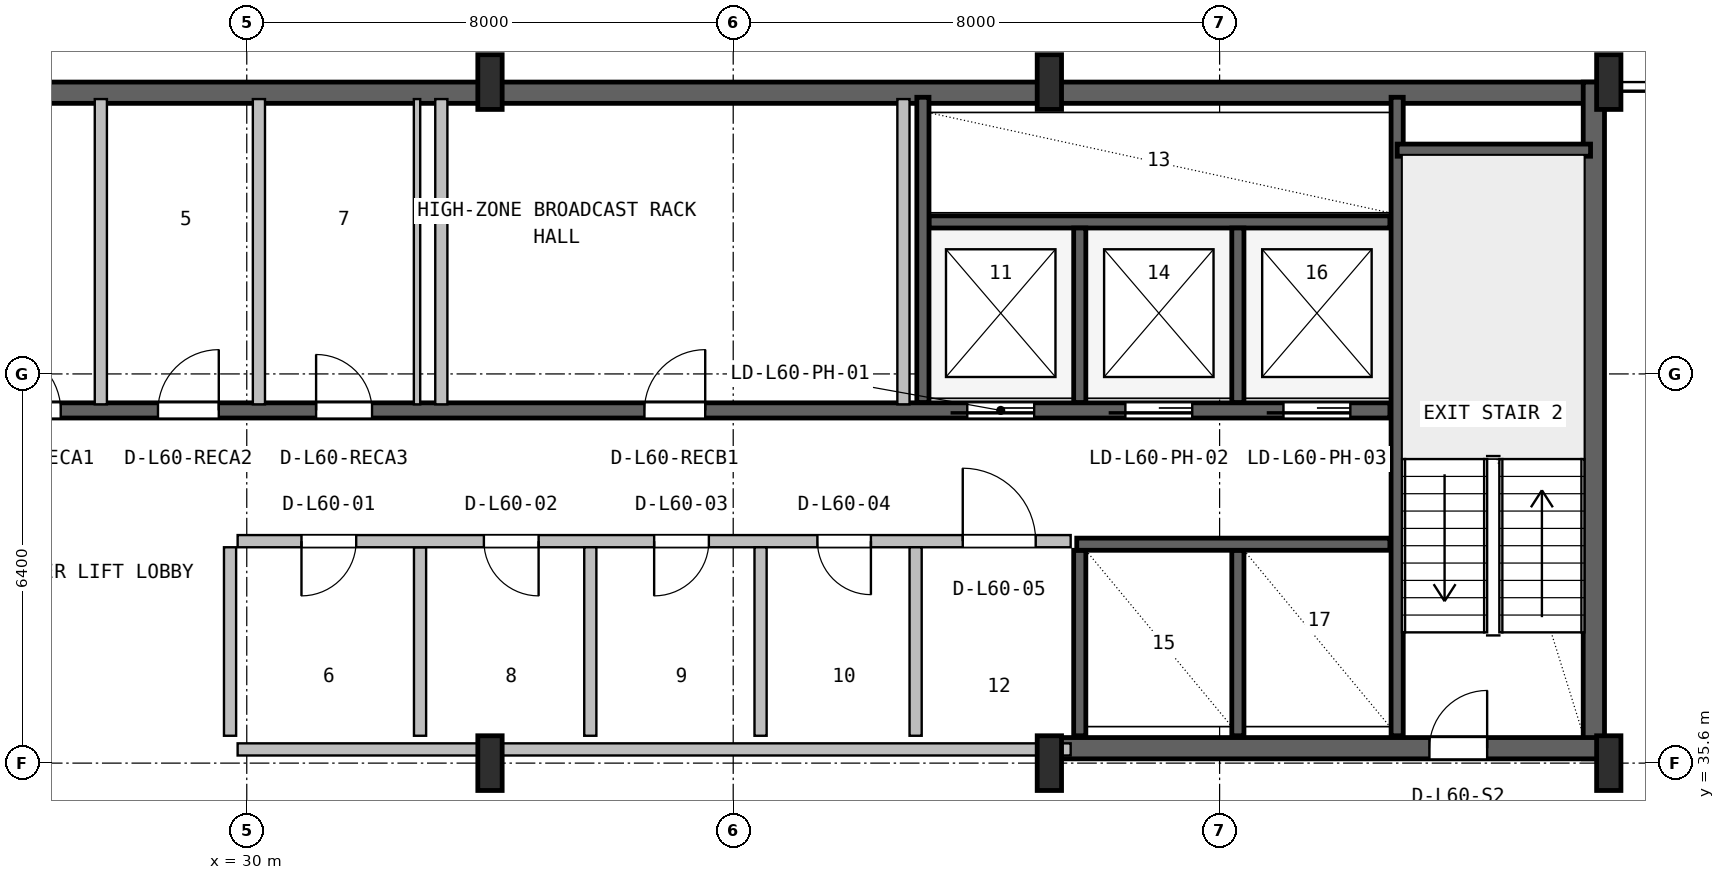
"""IFC4 building model, lengths in metres.
Left out: names, types, materials, properties, quantities, classifications, styles, units other than length and angle.
Written with IfcOpenShell. Run it as: python <this file> out.ifc"""

import sys

from ifc_helpers import new_model, si_unit, direction, frame, frame_2d, origin, origin_2d, place, context, subcontext, project, spatial, rectangle, i_section, extrude, source, transform, mapped, element, fill, save


model = new_model("IFC4")
c1 = context("Model", 3, precision=1e-05, world=origin(), true_north=direction((0.0, 1.0)))
c2 = subcontext(c1, "Body", "Model", "MODEL_VIEW")
j1 = project(units=[si_unit("LENGTHUNIT", "METRE"), si_unit("PLANEANGLEUNIT", "RADIAN")], contexts=[c1])
p1 = place(None, origin())
s1 = spatial("IfcSite", under=j1, at=p1, CompositionType="ELEMENT")
p2 = place(p1, origin())
s2 = spatial("IfcBuilding", under=s1, at=p2, CompositionType="ELEMENT")
p3 = place(p2, frame((0.0, 0.0, 243.2)))
s3 = spatial("IfcBuildingStorey", under=s2, at=p3, CompositionType="ELEMENT", Elevation=243.2)
p4 = place(p3, frame((15.6, 46.625, 0.0), z_axis=(0.0, 0.0, 1.0), x_axis=(1.0, 0.0, 0.0)))
e1 = element("IfcWall", 1, at=p4, inside=s3, PredefinedType="SHEAR", context=c2, shape_type="SweptSolid", body=[
    extrude(rectangle(XDim=36.8, YDim=0.35, at=frame_2d((18.4, 0.0))), origin(), (0.0, 0.0, 1.0), 3.55),
])
p5 = place(p3, frame((52.155, 35.67, 0.0), z_axis=(0.0, 0.0, 1.0), x_axis=(0.0, 1.0, 0.0)))
e2 = element("IfcWall", 2, at=p5, inside=s3, PredefinedType="SHEAR", context=c2, shape_type="SweptSolid", body=[
    extrude(rectangle(XDim=11.13, YDim=0.35, at=frame_2d((5.565, 0.0))), origin(), (0.0, 0.0, 1.0), 3.55),
])
p6 = place(p3, frame((43.2, 35.845, 0.0), z_axis=(0.0, 0.0, 1.0), x_axis=(1.0, 0.0, 0.0)))
e3 = element("IfcWall", 3, at=p6, inside=s3, PredefinedType="SHEAR", context=c2, shape_type="SweptSolid", body=[
    extrude(rectangle(XDim=9.13, YDim=0.35, at=frame_2d((4.565, 0.0))), origin(), (0.0, 0.0, 1.0), 3.55),
])
p7 = place(p6, frame((6.25, 0.0, 0.0)))
e4 = element("IfcOpeningElement", 4, at=p7, cuts=e3, PredefinedType="OPENING", context=c2, shape_type="SweptSolid", body=[
    extrude(rectangle(XDim=0.95, YDim=2.1, at=frame_2d((0.475, 1.05))), frame((0.0, 0.185, 0.0), z_axis=(0.0, -1.0, 0.0), x_axis=(1.0, 0.0, 0.0)), (0.0, 0.0, 1.0), 0.37),
])
m1 = source(origin(), c2, "Body", "SweptSolid", [
    extrude(i_section(OverallWidth=0.4, OverallDepth=0.9, WebThickness=0.016, FlangeThickness=0.028, FilletRadius=0.016, at=origin_2d()), origin(), (0.0, 0.0, 1.0), 3.8),
])
for number, where, z_axis, x_axis in (
    (5, (34.0, 35.6, 0.0), (0.0, 0.0, 1.0), (1.0, 0.0, 0.0)),
    (6, (34.0, 46.8, 0.0), (0.0, 0.0, 1.0), (1.0, 0.0, 0.0)),
    (7, (43.2, 35.6, 0.0), (0.0, 0.0, 1.0), (1.0, 0.0, 0.0)),
    (8, (43.2, 46.8, 0.0), (0.0, 0.0, 1.0), (1.0, 0.0, 0.0)),
    (9, (52.4, 35.6, 0.0), (0.0, 0.0, 1.0), (1.0, 0.0, 0.0)),
    (10, (52.4, 46.8, 0.0), (0.0, 0.0, 1.0), (1.0, 0.0, 0.0)),
):
    element("IfcColumn", number, at=place(p3, frame(where, z_axis=z_axis, x_axis=x_axis)), inside=s3, PredefinedType="COLUMN", context=c2, shape_type="MappedRepresentation", body=[
        mapped(m1, transform((0.0, 0.0, 0.0), x_axis=(1.0, 0.0, 0.0), y_axis=(0.0, 1.0, 0.0), z_axis=(0.0, 0.0, 1.0), scale=1.0)),
    ])
p8 = place(p3, frame((48.92, 36.05, 0.0), z_axis=(0.0, 0.0, 1.0), x_axis=(0.0, 1.0, 0.0)))
e11 = element("IfcWall", 11, at=p8, inside=s3, PredefinedType="SHEAR", context=c2, shape_type="SweptSolid", body=[
    extrude(rectangle(XDim=10.5, YDim=0.2, at=frame_2d((5.25, 0.0))), origin(), (0.0, 0.0, 1.0), 3.55),
])
p9 = place(p3, frame((48.92, 45.68, 0.0), z_axis=(0.0, 0.0, 1.0), x_axis=(1.0, 0.0, 0.0)))
e12 = element("IfcWall", 12, at=p9, inside=s3, PredefinedType="SHEAR", context=c2, shape_type="SweptSolid", body=[
    extrude(rectangle(XDim=3.18, YDim=0.2, at=frame_2d((1.59, 0.0))), origin(), (0.0, 0.0, 1.0), 3.55),
])
p10 = place(p3, frame((24.98, 41.4, 0.0), z_axis=(0.0, 0.0, 1.0), x_axis=(1.0, 0.0, 0.0)))
e13 = element("IfcWall", 13, at=p10, inside=s3, PredefinedType="SHEAR", context=c2, shape_type="SweptSolid", body=[
    extrude(rectangle(XDim=23.82, YDim=0.25, at=frame_2d((11.91, 0.0))), origin(), (0.0, 0.0, 1.0), 3.55),
])
p11 = place(p10, frame((16.87, 0.0, 0.0)))
e14 = element("IfcOpeningElement", 14, at=p11, cuts=e13, PredefinedType="OPENING", context=c2, shape_type="SweptSolid", body=[
    extrude(rectangle(XDim=1.1, YDim=2.18, at=frame_2d((0.55, 1.09))), frame((0.0, 0.135, 0.0), z_axis=(0.0, -1.0, 0.0), x_axis=(1.0, 0.0, 0.0)), (0.0, 0.0, 1.0), 0.27),
])
p12 = place(p10, frame((19.47, 0.0, 0.0)))
e15 = element("IfcOpeningElement", 15, at=p12, cuts=e13, PredefinedType="OPENING", context=c2, shape_type="SweptSolid", body=[
    extrude(rectangle(XDim=1.1, YDim=2.18, at=frame_2d((0.55, 1.09))), frame((0.0, 0.135, 0.0), z_axis=(0.0, -1.0, 0.0), x_axis=(1.0, 0.0, 0.0)), (0.0, 0.0, 1.0), 0.27),
])
p13 = place(p10, frame((22.07, 0.0, 0.0)))
e16 = element("IfcOpeningElement", 16, at=p13, cuts=e13, PredefinedType="OPENING", context=c2, shape_type="SweptSolid", body=[
    extrude(rectangle(XDim=1.1, YDim=2.18, at=frame_2d((0.55, 1.09))), frame((0.0, 0.135, 0.0), z_axis=(0.0, -1.0, 0.0), x_axis=(1.0, 0.0, 0.0)), (0.0, 0.0, 1.0), 0.27),
])
p14 = place(p10, frame((0.96, 0.0, 0.0)))
e17 = element("IfcOpeningElement", 17, at=p14, cuts=e13, PredefinedType="OPENING", context=c2, shape_type="SweptSolid", body=[
    extrude(rectangle(XDim=1.0, YDim=2.08, at=frame_2d((0.5, 1.04))), frame((0.0, 0.135, 0.0), z_axis=(0.0, -1.0, 0.0), x_axis=(1.0, 0.0, 0.0)), (0.0, 0.0, 1.0), 0.27),
])
p15 = place(p10, frame((3.56, 0.0, 0.0)))
e18 = element("IfcOpeningElement", 18, at=p15, cuts=e13, PredefinedType="OPENING", context=c2, shape_type="SweptSolid", body=[
    extrude(rectangle(XDim=1.0, YDim=2.08, at=frame_2d((0.5, 1.04))), frame((0.0, 0.135, 0.0), z_axis=(0.0, -1.0, 0.0), x_axis=(1.0, 0.0, 0.0)), (0.0, 0.0, 1.0), 0.27),
])
p16 = place(p10, frame((6.16, 0.0, 0.0)))
e19 = element("IfcOpeningElement", 19, at=p16, cuts=e13, PredefinedType="OPENING", context=c2, shape_type="SweptSolid", body=[
    extrude(rectangle(XDim=0.92, YDim=2.08, at=frame_2d((0.46, 1.04))), frame((0.0, 0.135, 0.0), z_axis=(0.0, -1.0, 0.0), x_axis=(1.0, 0.0, 0.0)), (0.0, 0.0, 1.0), 0.27),
])
p17 = place(p10, frame((11.56, 0.0, 0.0)))
e20 = element("IfcOpeningElement", 20, at=p17, cuts=e13, PredefinedType="OPENING", context=c2, shape_type="SweptSolid", body=[
    extrude(rectangle(XDim=1.0, YDim=2.08, at=frame_2d((0.5, 1.04))), frame((0.0, 0.135, 0.0), z_axis=(0.0, -1.0, 0.0), x_axis=(1.0, 0.0, 0.0)), (0.0, 0.0, 1.0), 0.27),
])
p18 = place(p3, frame((41.22, 44.5, 0.0), z_axis=(0.0, 0.0, 1.0), x_axis=(1.0, 0.0, 0.0)))
e21 = element("IfcWall", 21, at=p18, inside=s3, PredefinedType="SHEAR", context=c2, shape_type="SweptSolid", body=[
    extrude(rectangle(XDim=7.58, YDim=0.2, at=frame_2d((3.79, 0.0))), origin(), (0.0, 0.0, 1.0), 3.55),
])
p19 = place(p3, frame((41.12, 41.53, 0.0), z_axis=(0.0, 0.0, 1.0), x_axis=(0.0, 1.0, 0.0)))
e22 = element("IfcWall", 22, at=p19, inside=s3, PredefinedType="SHEAR", context=c2, shape_type="SweptSolid", body=[
    extrude(rectangle(XDim=5.02, YDim=0.2, at=frame_2d((2.51, 0.0))), origin(), (0.0, 0.0, 1.0), 3.55),
])
for number, where, z_axis, x_axis in (
    (23, (43.7, 41.53, 0.0), (0.0, 0.0, 1.0), (0.0, 1.0, 0.0)),
    (24, (46.3, 41.53, 0.0), (0.0, 0.0, 1.0), (0.0, 1.0, 0.0)),
):
    element("IfcWall", number, at=place(p3, frame(where, z_axis=z_axis, x_axis=x_axis)), inside=s3, PredefinedType="SHEAR", context=c2, shape_type="SweptSolid", body=[
        extrude(rectangle(XDim=2.87, YDim=0.2, at=frame_2d((1.435, 0.0))), origin(), (0.0, 0.0, 1.0), 3.55),
    ])
for number, where, z_axis, x_axis in (
    (25, (43.7, 36.05, 0.0), (0.0, 0.0, 1.0), (0.0, 1.0, 0.0)),
    (26, (46.3, 36.05, 0.0), (0.0, 0.0, 1.0), (0.0, 1.0, 0.0)),
):
    element("IfcWall", number, at=place(p3, frame(where, z_axis=z_axis, x_axis=x_axis)), inside=s3, PredefinedType="SHEAR", context=c2, shape_type="SweptSolid", body=[
        extrude(rectangle(XDim=3.05, YDim=0.2, at=frame_2d((1.525, 0.0))), origin(), (0.0, 0.0, 1.0), 3.55),
    ])
p20 = place(p3, frame((43.65, 39.2, 0.0), z_axis=(0.0, 0.0, 1.0), x_axis=(1.0, 0.0, 0.0)))
e27 = element("IfcWall", 27, at=p20, inside=s3, PredefinedType="SHEAR", context=c2, shape_type="SweptSolid", body=[
    extrude(rectangle(XDim=5.15, YDim=0.2, at=frame_2d((2.575, 0.0))), origin(), (0.0, 0.0, 1.0), 3.55),
])
p21 = place(p3, frame((29.85, 35.825, 0.0), z_axis=(0.0, 0.0, 1.0), x_axis=(1.0, 0.0, 0.0)))
e28 = element("IfcWall", 28, at=p21, inside=s3, PredefinedType="SOLIDWALL", context=c2, shape_type="SweptSolid", body=[
    extrude(rectangle(XDim=13.7, YDim=0.2, at=frame_2d((6.85, 0.0))), origin(), (0.0, 0.0, 1.0), 2.575),
])
p22 = place(p3, frame((32.85, 36.05, 0.0), z_axis=(0.0, 0.0, 1.0), x_axis=(0.0, 1.0, 0.0)))
e29 = element("IfcWall", 29, at=p22, inside=s3, PredefinedType="PLUMBINGWALL", context=c2, shape_type="SweptSolid", body=[
    extrude(rectangle(XDim=3.1, YDim=0.2, at=frame_2d((1.55, 0.0))), origin(), (0.0, 0.0, 1.0), 3.53),
])
p23 = place(p3, frame((29.85, 39.25, 0.0), z_axis=(0.0, 0.0, 1.0), x_axis=(1.0, 0.0, 0.0)))
e30 = element("IfcWall", 30, at=p23, inside=s3, PredefinedType="SOLIDWALL", context=c2, shape_type="SweptSolid", body=[
    extrude(rectangle(XDim=13.7, YDim=0.2, at=frame_2d((6.85, 0.0))), origin(), (0.0, 0.0, 1.0), 3.53),
])
p24 = place(p23, frame((1.05, 0.0, 0.0)))
e31 = element("IfcOpeningElement", 31, at=p24, cuts=e30, PredefinedType="OPENING", context=c2, shape_type="SweptSolid", body=[
    extrude(rectangle(XDim=0.9, YDim=2.06, at=frame_2d((0.45, 1.03))), frame((0.0, 0.11, 0.0), z_axis=(0.0, -1.0, 0.0), x_axis=(1.0, 0.0, 0.0)), (0.0, 0.0, 1.0), 0.22),
])
p25 = place(p23, frame((4.05, 0.0, 0.0)))
e32 = element("IfcOpeningElement", 32, at=p25, cuts=e30, PredefinedType="OPENING", context=c2, shape_type="SweptSolid", body=[
    extrude(rectangle(XDim=0.9, YDim=2.06, at=frame_2d((0.45, 1.03))), frame((0.0, 0.11, 0.0), z_axis=(0.0, -1.0, 0.0), x_axis=(1.0, 0.0, 0.0)), (0.0, 0.0, 1.0), 0.22),
])
p26 = place(p23, frame((6.85, 0.0, 0.0)))
e33 = element("IfcOpeningElement", 33, at=p26, cuts=e30, PredefinedType="OPENING", context=c2, shape_type="SweptSolid", body=[
    extrude(rectangle(XDim=0.9, YDim=2.06, at=frame_2d((0.45, 1.03))), frame((0.0, 0.11, 0.0), z_axis=(0.0, -1.0, 0.0), x_axis=(1.0, 0.0, 0.0)), (0.0, 0.0, 1.0), 0.22),
])
p27 = place(p23, frame((9.535, 0.0, 0.0)))
e34 = element("IfcOpeningElement", 34, at=p27, cuts=e30, PredefinedType="OPENING", context=c2, shape_type="SweptSolid", body=[
    extrude(rectangle(XDim=0.88, YDim=2.06, at=frame_2d((0.44, 1.03))), frame((0.0, 0.11, 0.0), z_axis=(0.0, -1.0, 0.0), x_axis=(1.0, 0.0, 0.0)), (0.0, 0.0, 1.0), 0.22),
])
p28 = place(p23, frame((11.925, 0.0, 0.0)))
e35 = element("IfcOpeningElement", 35, at=p28, cuts=e30, PredefinedType="OPENING", context=c2, shape_type="SweptSolid", body=[
    extrude(rectangle(XDim=1.2, YDim=2.1, at=frame_2d((0.6, 1.05))), frame((0.0, 0.11, 0.0), z_axis=(0.0, -1.0, 0.0), x_axis=(1.0, 0.0, 0.0)), (0.0, 0.0, 1.0), 0.22),
])
for number, where, z_axis, x_axis in (
    (36, (29.725, 36.05, 0.0), (0.0, 0.0, 1.0), (0.0, 1.0, 0.0)),
    (37, (35.65, 36.05, 0.0), (0.0, 0.0, 1.0), (0.0, 1.0, 0.0)),
    (38, (38.45, 36.05, 0.0), (0.0, 0.0, 1.0), (0.0, 1.0, 0.0)),
):
    element("IfcWall", number, at=place(p3, frame(where, z_axis=z_axis, x_axis=x_axis)), inside=s3, PredefinedType="PLUMBINGWALL", context=c2, shape_type="SweptSolid", body=[
        extrude(rectangle(XDim=3.1, YDim=0.2, at=frame_2d((1.55, 0.0))), origin(), (0.0, 0.0, 1.0), 3.53),
    ])
p29 = place(p3, frame((41.0, 36.05, 0.0), z_axis=(0.0, 0.0, 1.0), x_axis=(0.0, 1.0, 0.0)))
e39 = element("IfcWall", 39, at=p29, inside=s3, PredefinedType="SOLIDWALL", context=c2, shape_type="SweptSolid", body=[
    extrude(rectangle(XDim=3.1, YDim=0.2, at=frame_2d((1.55, 0.0))), origin(), (0.0, 0.0, 1.0), 3.53),
])
for number, where, z_axis, x_axis in (
    (40, (27.6, 41.5, 0.0), (0.0, 0.0, 1.0), (0.0, 1.0, 0.0)),
    (41, (30.2, 41.5, 0.0), (0.0, 0.0, 1.0), (0.0, 1.0, 0.0)),
):
    element("IfcWall", number, at=place(p3, frame(where, z_axis=z_axis, x_axis=x_axis)), inside=s3, PredefinedType="SOLIDWALL", context=c2, shape_type="SweptSolid", body=[
        extrude(rectangle(XDim=5.02, YDim=0.2, at=frame_2d((2.51, 0.0))), origin(), (0.0, 0.0, 1.0), 3.53),
    ])
p30 = place(p3, frame((32.8, 41.5, 0.0), z_axis=(0.0, 0.0, 1.0), x_axis=(0.0, 1.0, 0.0)))
e42 = element("IfcWall", 42, at=p30, inside=s3, PredefinedType="PARTITIONING", context=c2, shape_type="SweptSolid", body=[
    extrude(rectangle(XDim=5.02, YDim=0.105, at=frame_2d((2.51, 0.0))), origin(), (0.0, 0.0, 1.0), 3.53),
])
for number, where, z_axis, x_axis in (
    (43, (40.8, 41.5, 0.0), (0.0, 0.0, 1.0), (0.0, 1.0, 0.0)),
    (44, (33.2, 41.5, 0.0), (0.0, 0.0, 1.0), (0.0, 1.0, 0.0)),
):
    element("IfcWall", number, at=place(p3, frame(where, z_axis=z_axis, x_axis=x_axis)), inside=s3, PredefinedType="SOLIDWALL", context=c2, shape_type="SweptSolid", body=[
        extrude(rectangle(XDim=5.02, YDim=0.2, at=frame_2d((2.51, 0.0))), origin(), (0.0, 0.0, 1.0), 3.53),
    ])
m2 = source(origin(), c2, "Body", "SweptSolid", [
    extrude(rectangle(XDim=0.95, YDim=2.1, at=frame_2d((0.475, 1.05))), frame((0.0, 0.025, 0.0), z_axis=(0.0, -1.0, 0.0), x_axis=(1.0, 0.0, 0.0)), (0.0, 0.0, 1.0), 0.05),
])
p31 = place(p7, origin())
e45 = element("IfcDoor", 45, at=p31, inside=s3, OperationType="SINGLE_SWING_RIGHT", PredefinedType="DOOR", context=c2, shape_type="MappedRepresentation", body=[
    mapped(m2, transform((0.0, 0.0, 0.0), x_axis=(1.0, 0.0, 0.0), y_axis=(0.0, 1.0, 0.0), z_axis=(0.0, 0.0, 1.0), scale=1.0)),
])
fill(e4, e45)
m3 = source(origin(), c2, "Body", "SweptSolid", [
    extrude(rectangle(XDim=1.1, YDim=2.18, at=frame_2d((0.55, 1.09))), frame((0.0, 0.025, 0.0), z_axis=(0.0, -1.0, 0.0), x_axis=(1.0, 0.0, 0.0)), (0.0, 0.0, 1.0), 0.05),
])
p32 = place(p11, frame((1.1, 0.0, 0.0), z_axis=(0.0, 0.0, 1.0), x_axis=(-1.0, 0.0, 0.0)))
e46 = element("IfcDoor", 46, at=p32, inside=s3, OperationType="SLIDING_TO_LEFT", PredefinedType="DOOR", context=c2, shape_type="MappedRepresentation", body=[
    mapped(m3, transform((0.0, 0.0, 0.0), x_axis=(1.0, 0.0, 0.0), y_axis=(0.0, 1.0, 0.0), z_axis=(0.0, 0.0, 1.0), scale=1.0)),
])
fill(e14, e46)
p33 = place(p12, frame((1.1, 0.0, 0.0), z_axis=(0.0, 0.0, 1.0), x_axis=(-1.0, 0.0, 0.0)))
e47 = element("IfcDoor", 47, at=p33, inside=s3, OperationType="SLIDING_TO_LEFT", PredefinedType="DOOR", context=c2, shape_type="MappedRepresentation", body=[
    mapped(m3, transform((0.0, 0.0, 0.0), x_axis=(1.0, 0.0, 0.0), y_axis=(0.0, 1.0, 0.0), z_axis=(0.0, 0.0, 1.0), scale=1.0)),
])
fill(e15, e47)
p34 = place(p13, frame((1.1, 0.0, 0.0), z_axis=(0.0, 0.0, 1.0), x_axis=(-1.0, 0.0, 0.0)))
e48 = element("IfcDoor", 48, at=p34, inside=s3, OperationType="SLIDING_TO_LEFT", PredefinedType="DOOR", context=c2, shape_type="MappedRepresentation", body=[
    mapped(m3, transform((0.0, 0.0, 0.0), x_axis=(1.0, 0.0, 0.0), y_axis=(0.0, 1.0, 0.0), z_axis=(0.0, 0.0, 1.0), scale=1.0)),
])
fill(e16, e48)
m4 = source(origin(), c2, "Body", "SweptSolid", [
    extrude(rectangle(XDim=1.0, YDim=2.08, at=frame_2d((0.5, 1.04))), frame((0.0, 0.025, 0.0), z_axis=(0.0, -1.0, 0.0), x_axis=(1.0, 0.0, 0.0)), (0.0, 0.0, 1.0), 0.05),
])
p35 = place(p14, origin())
e49 = element("IfcDoor", 49, at=p35, inside=s3, OperationType="SINGLE_SWING_LEFT", PredefinedType="DOOR", context=c2, shape_type="MappedRepresentation", body=[
    mapped(m4, transform((0.0, 0.0, 0.0), x_axis=(1.0, 0.0, 0.0), y_axis=(0.0, 1.0, 0.0), z_axis=(0.0, 0.0, 1.0), scale=1.0)),
])
fill(e17, e49)
p36 = place(p15, origin())
e50 = element("IfcDoor", 50, at=p36, inside=s3, OperationType="SINGLE_SWING_RIGHT", PredefinedType="DOOR", context=c2, shape_type="MappedRepresentation", body=[
    mapped(m4, transform((0.0, 0.0, 0.0), x_axis=(1.0, 0.0, 0.0), y_axis=(0.0, 1.0, 0.0), z_axis=(0.0, 0.0, 1.0), scale=1.0)),
])
fill(e18, e50)
m5 = source(origin(), c2, "Body", "SweptSolid", [
    extrude(rectangle(XDim=0.92, YDim=2.08, at=frame_2d((0.46, 1.04))), frame((0.0, 0.025, 0.0), z_axis=(0.0, -1.0, 0.0), x_axis=(1.0, 0.0, 0.0)), (0.0, 0.0, 1.0), 0.05),
])
p37 = place(p16, origin())
e51 = element("IfcDoor", 51, at=p37, inside=s3, OperationType="SINGLE_SWING_LEFT", PredefinedType="DOOR", context=c2, shape_type="MappedRepresentation", body=[
    mapped(m5, transform((0.0, 0.0, 0.0), x_axis=(1.0, 0.0, 0.0), y_axis=(0.0, 1.0, 0.0), z_axis=(0.0, 0.0, 1.0), scale=1.0)),
])
fill(e19, e51)
p38 = place(p17, origin())
e52 = element("IfcDoor", 52, at=p38, inside=s3, OperationType="SINGLE_SWING_RIGHT", PredefinedType="DOOR", context=c2, shape_type="MappedRepresentation", body=[
    mapped(m4, transform((0.0, 0.0, 0.0), x_axis=(1.0, 0.0, 0.0), y_axis=(0.0, 1.0, 0.0), z_axis=(0.0, 0.0, 1.0), scale=1.0)),
])
fill(e20, e52)
m6 = source(origin(), c2, "Body", "SweptSolid", [
    extrude(rectangle(XDim=0.9, YDim=2.06, at=frame_2d((0.45, 1.03))), frame((0.0, 0.025, 0.0), z_axis=(0.0, -1.0, 0.0), x_axis=(1.0, 0.0, 0.0)), (0.0, 0.0, 1.0), 0.05),
])
p39 = place(p24, frame((0.9, 0.0, 0.0), z_axis=(0.0, 0.0, 1.0), x_axis=(-1.0, 0.0, 0.0)))
e53 = element("IfcDoor", 53, at=p39, inside=s3, OperationType="SINGLE_SWING_LEFT", PredefinedType="DOOR", context=c2, shape_type="MappedRepresentation", body=[
    mapped(m6, transform((0.0, 0.0, 0.0), x_axis=(1.0, 0.0, 0.0), y_axis=(0.0, 1.0, 0.0), z_axis=(0.0, 0.0, 1.0), scale=1.0)),
])
fill(e31, e53)
p40 = place(p25, frame((0.9, 0.0, 0.0), z_axis=(0.0, 0.0, 1.0), x_axis=(-1.0, 0.0, 0.0)))
e54 = element("IfcDoor", 54, at=p40, inside=s3, OperationType="SINGLE_SWING_RIGHT", PredefinedType="DOOR", context=c2, shape_type="MappedRepresentation", body=[
    mapped(m6, transform((0.0, 0.0, 0.0), x_axis=(1.0, 0.0, 0.0), y_axis=(0.0, 1.0, 0.0), z_axis=(0.0, 0.0, 1.0), scale=1.0)),
])
fill(e32, e54)
p41 = place(p26, frame((0.9, 0.0, 0.0), z_axis=(0.0, 0.0, 1.0), x_axis=(-1.0, 0.0, 0.0)))
e55 = element("IfcDoor", 55, at=p41, inside=s3, OperationType="SINGLE_SWING_LEFT", PredefinedType="DOOR", context=c2, shape_type="MappedRepresentation", body=[
    mapped(m6, transform((0.0, 0.0, 0.0), x_axis=(1.0, 0.0, 0.0), y_axis=(0.0, 1.0, 0.0), z_axis=(0.0, 0.0, 1.0), scale=1.0)),
])
fill(e33, e55)
m7 = source(origin(), c2, "Body", "SweptSolid", [
    extrude(rectangle(XDim=0.88, YDim=2.06, at=frame_2d((0.44, 1.03))), frame((0.0, 0.025, 0.0), z_axis=(0.0, -1.0, 0.0), x_axis=(1.0, 0.0, 0.0)), (0.0, 0.0, 1.0), 0.05),
])
p42 = place(p27, frame((0.88, 0.0, 0.0), z_axis=(0.0, 0.0, 1.0), x_axis=(-1.0, 0.0, 0.0)))
e56 = element("IfcDoor", 56, at=p42, inside=s3, OperationType="SINGLE_SWING_RIGHT", PredefinedType="DOOR", context=c2, shape_type="MappedRepresentation", body=[
    mapped(m7, transform((0.0, 0.0, 0.0), x_axis=(1.0, 0.0, 0.0), y_axis=(0.0, 1.0, 0.0), z_axis=(0.0, 0.0, 1.0), scale=1.0)),
])
fill(e34, e56)
m8 = source(origin(), c2, "Body", "SweptSolid", [
    extrude(rectangle(XDim=1.2, YDim=2.1, at=frame_2d((0.6, 1.05))), frame((0.0, 0.025, 0.0), z_axis=(0.0, -1.0, 0.0), x_axis=(1.0, 0.0, 0.0)), (0.0, 0.0, 1.0), 0.05),
])
p43 = place(p28, origin())
e57 = element("IfcDoor", 57, at=p43, inside=s3, OperationType="SINGLE_SWING_LEFT", PredefinedType="DOOR", context=c2, shape_type="MappedRepresentation", body=[
    mapped(m8, transform((0.0, 0.0, 0.0), x_axis=(1.0, 0.0, 0.0), y_axis=(0.0, 1.0, 0.0), z_axis=(0.0, 0.0, 1.0), scale=1.0)),
])
fill(e35, e57)
save(model, sys.argv[1])
